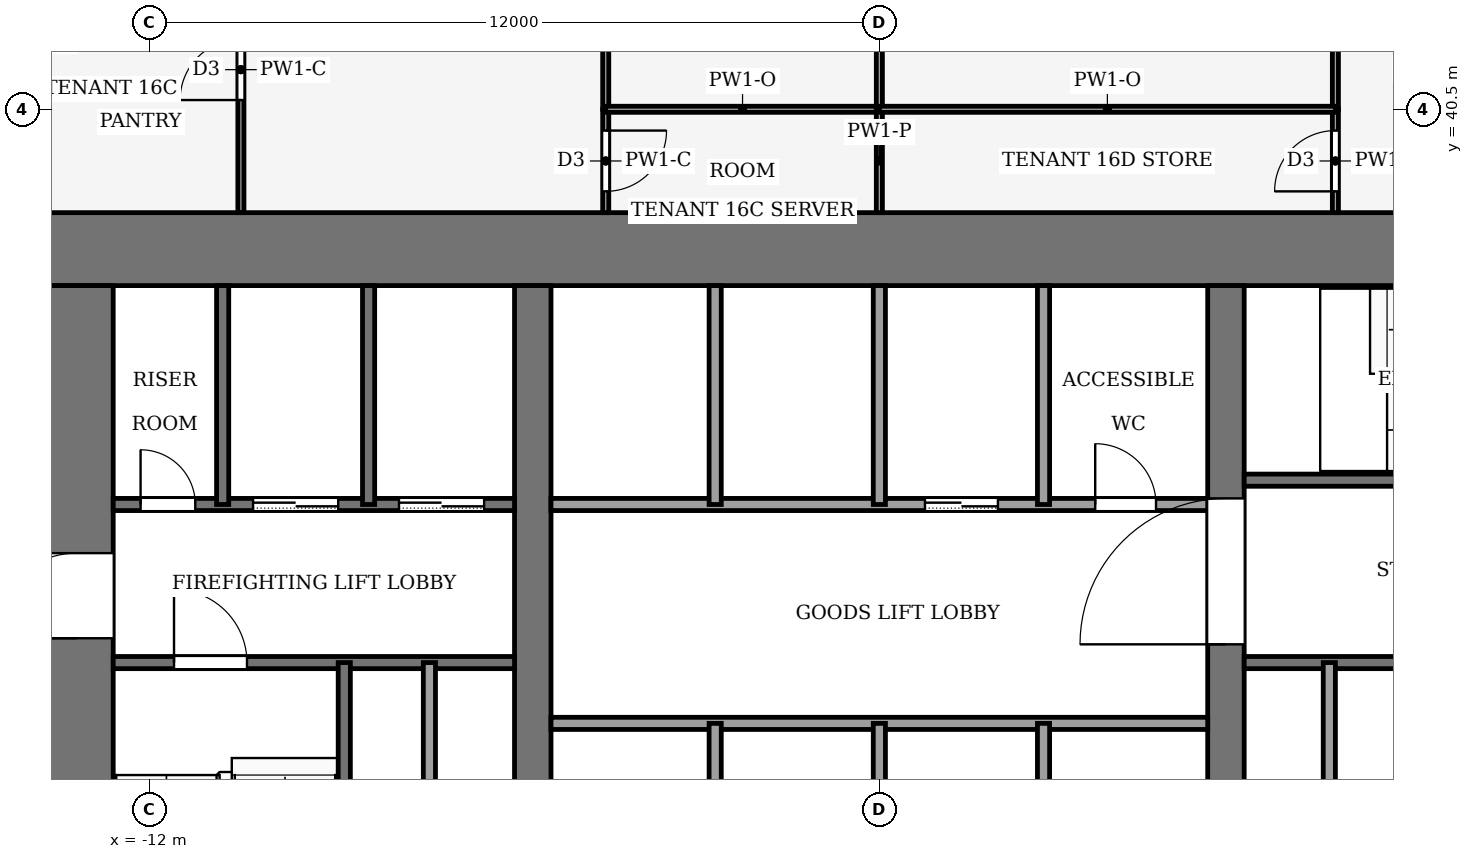
"""IFC4 building model, lengths in metres.
Left out: names, types, materials, properties, quantities, classifications, styles, units other than length and angle.
Written with IfcOpenShell. Run it as: python <this file> out.ifc"""

import sys

from ifc_helpers import new_model, si_unit, direction, frame, frame_2d, origin, place, context, subcontext, project, spatial, rectangle, extrude, element, fill, save


model = new_model("IFC4")
c1 = context("Model", 3, precision=1e-05, world=origin(), true_north=direction((0.0, 1.0)))
c2 = subcontext(c1, "Body", "Model", "MODEL_VIEW")
j1 = project(units=[si_unit("LENGTHUNIT", "METRE"), si_unit("PLANEANGLEUNIT", "RADIAN")], contexts=[c1])
p1 = place(None, origin())
s1 = spatial("IfcSite", under=j1, at=p1, CompositionType="ELEMENT")
p2 = place(p1, origin())
s2 = spatial("IfcBuilding", under=s1, at=p2, CompositionType="ELEMENT")
p3 = place(p2, frame((0.0, 0.0, 74.0)))
s3 = spatial("IfcBuildingStorey", under=s2, at=p3, CompositionType="ELEMENT", Elevation=74.0)
p4 = place(p3, frame((-13.8, 38.2, -0.13), z_axis=(0.0, 0.0, 1.0), x_axis=(1.0, 0.0, 0.0)))
e1 = element("IfcWall", 1, at=p4, inside=s3, PredefinedType="SHEAR", context=c2, shape_type="SweptSolid", body=[
    extrude(rectangle(XDim=27.6, YDim=1.2, at=frame_2d((13.8, 0.0))), origin(), (0.0, 0.0, 1.0), 4.0),
])
p5 = place(p3, frame((-13.2, 18.4, -0.13), z_axis=(0.0, 0.0, 1.0), x_axis=(0.0, 1.0, 0.0)))
e2 = element("IfcWall", 2, at=p5, inside=s3, PredefinedType="SHEAR", context=c2, shape_type="SweptSolid", body=[
    extrude(rectangle(XDim=19.2, YDim=1.2, at=frame_2d((9.6, 0.0))), origin(), (0.0, 0.0, 1.0), 4.0),
])
p6 = place(p5, frame((2.8, 0.0, 0.13)))
e3 = element("IfcOpeningElement", 3, at=p6, cuts=e2, PredefinedType="OPENING", context=c2, shape_type="SweptSolid", body=[
    extrude(rectangle(XDim=2.4, YDim=2.4, at=frame_2d((1.2, 1.2))), frame((0.0, 0.61, 0.0), z_axis=(0.0, -1.0, 0.0), x_axis=(1.0, 0.0, 0.0)), (0.0, 0.0, 1.0), 1.22),
])
p7 = place(p5, frame((13.4, 0.0, 0.13)))
e4 = element("IfcOpeningElement", 4, at=p7, cuts=e2, PredefinedType="OPENING", context=c2, shape_type="SweptSolid", body=[
    extrude(rectangle(XDim=1.4, YDim=2.2, at=frame_2d((0.7, 1.1))), frame((0.0, 0.61, 0.0), z_axis=(0.0, -1.0, 0.0), x_axis=(1.0, 0.0, 0.0)), (0.0, 0.0, 1.0), 1.22),
])
p8 = place(p3, frame((-5.7, 18.4, -0.13), z_axis=(0.0, 0.0, 1.0), x_axis=(0.0, 1.0, 0.0)))
e5 = element("IfcWall", 5, at=p8, inside=s3, PredefinedType="SHEAR", context=c2, shape_type="SweptSolid", body=[
    extrude(rectangle(XDim=19.2, YDim=0.6, at=frame_2d((9.6, 0.0))), origin(), (0.0, 0.0, 1.0), 4.0),
])
p9 = place(p8, frame((8.35, 0.0, 0.13)))
e6 = element("IfcOpeningElement", 6, at=p9, cuts=e5, PredefinedType="OPENING", context=c2, shape_type="SweptSolid", body=[
    extrude(rectangle(XDim=0.9, YDim=2.1, at=frame_2d((0.45, 1.05))), frame((0.0, 0.31, 0.0), z_axis=(0.0, -1.0, 0.0), x_axis=(1.0, 0.0, 0.0)), (0.0, 0.0, 1.0), 0.62),
])
p10 = place(p3, frame((5.7, 18.4, -0.13), z_axis=(0.0, 0.0, 1.0), x_axis=(0.0, 1.0, 0.0)))
e7 = element("IfcWall", 7, at=p10, inside=s3, PredefinedType="SHEAR", context=c2, shape_type="SweptSolid", body=[
    extrude(rectangle(XDim=19.2, YDim=0.6, at=frame_2d((9.6, 0.0))), origin(), (0.0, 0.0, 1.0), 4.0),
])
p11 = place(p10, frame((8.35, 0.0, 0.13)))
e8 = element("IfcOpeningElement", 8, at=p11, cuts=e7, PredefinedType="OPENING", context=c2, shape_type="SweptSolid", body=[
    extrude(rectangle(XDim=0.9, YDim=2.1, at=frame_2d((0.45, 1.05))), frame((0.0, 0.31, 0.0), z_axis=(0.0, -1.0, 0.0), x_axis=(1.0, 0.0, 0.0)), (0.0, 0.0, 1.0), 0.62),
])
p12 = place(p10, frame((13.3, 0.0, 0.13)))
e9 = element("IfcOpeningElement", 9, at=p12, cuts=e7, PredefinedType="OPENING", context=c2, shape_type="SweptSolid", body=[
    extrude(rectangle(XDim=2.4, YDim=2.4, at=frame_2d((1.2, 1.2))), frame((0.0, 0.31, 0.0), z_axis=(0.0, -1.0, 0.0), x_axis=(1.0, 0.0, 0.0)), (0.0, 0.0, 1.0), 0.62),
])
p13 = place(p3, frame((-5.4, 30.4, 0.0), z_axis=(0.0, 0.0, 1.0), x_axis=(1.0, 0.0, 0.0)))
e10 = element("IfcWall", 10, at=p13, inside=s3, PredefinedType="PARTITIONING", context=c2, shape_type="SweptSolid", body=[
    extrude(rectangle(XDim=10.8, YDim=0.2, at=frame_2d((5.4, 0.0))), origin(), (0.0, 0.0, 1.0), 3.87),
])
p14 = place(p3, frame((-12.6, 31.4, 0.0), z_axis=(0.0, 0.0, 1.0), x_axis=(1.0, 0.0, 0.0)))
e11 = element("IfcWall", 11, at=p14, inside=s3, PredefinedType="PARTITIONING", context=c2, shape_type="SweptSolid", body=[
    extrude(rectangle(XDim=6.6, YDim=0.2, at=frame_2d((3.3, 0.0))), origin(), (0.0, 0.0, 1.0), 3.87),
])
p15 = place(p14, frame((1.0, 0.0, 0.0)))
e12 = element("IfcOpeningElement", 12, at=p15, cuts=e11, PredefinedType="OPENING", context=c2, shape_type="SweptSolid", body=[
    extrude(rectangle(XDim=1.2, YDim=2.2, at=frame_2d((0.6, 1.1))), frame((0.0, 0.11, 0.0), z_axis=(0.0, -1.0, 0.0), x_axis=(1.0, 0.0, 0.0)), (0.0, 0.0, 1.0), 0.22),
])
p16 = place(p3, frame((6.0, 31.4, 0.0), z_axis=(0.0, 0.0, 1.0), x_axis=(1.0, 0.0, 0.0)))
e13 = element("IfcWall", 13, at=p16, inside=s3, PredefinedType="PARTITIONING", context=c2, shape_type="SweptSolid", body=[
    extrude(rectangle(XDim=6.6, YDim=0.2, at=frame_2d((3.3, 0.0))), origin(), (0.0, 0.0, 1.0), 3.87),
])
p17 = place(p3, frame((-12.6, 34.0, 0.0), z_axis=(0.0, 0.0, 1.0), x_axis=(1.0, 0.0, 0.0)))
e14 = element("IfcWall", 14, at=p17, inside=s3, PredefinedType="PARTITIONING", context=c2, shape_type="SweptSolid", body=[
    extrude(rectangle(XDim=6.6, YDim=0.2, at=frame_2d((3.3, 0.0))), origin(), (0.0, 0.0, 1.0), 3.87),
])
p18 = place(p17, frame((4.7, 0.0, 0.0)))
e15 = element("IfcOpeningElement", 15, at=p18, cuts=e14, PredefinedType="OPENING", context=c2, shape_type="SweptSolid", body=[
    extrude(rectangle(XDim=1.4, YDim=2.2, at=frame_2d((0.7, 1.1))), frame((0.0, 0.11, 0.0), z_axis=(0.0, -1.0, 0.0), x_axis=(1.0, 0.0, 0.0)), (0.0, 0.0, 1.0), 0.22),
])
p19 = place(p17, frame((2.3, 0.0, 0.0)))
e16 = element("IfcOpeningElement", 16, at=p19, cuts=e14, PredefinedType="OPENING", context=c2, shape_type="SweptSolid", body=[
    extrude(rectangle(XDim=1.4, YDim=2.2, at=frame_2d((0.7, 1.1))), frame((0.0, 0.11, 0.0), z_axis=(0.0, -1.0, 0.0), x_axis=(1.0, 0.0, 0.0)), (0.0, 0.0, 1.0), 0.22),
])
p20 = place(p17, frame((0.45, 0.0, 0.0)))
e17 = element("IfcOpeningElement", 17, at=p20, cuts=e14, PredefinedType="OPENING", context=c2, shape_type="SweptSolid", body=[
    extrude(rectangle(XDim=0.9, YDim=2.1, at=frame_2d((0.45, 1.05))), frame((0.0, 0.11, 0.0), z_axis=(0.0, -1.0, 0.0), x_axis=(1.0, 0.0, 0.0)), (0.0, 0.0, 1.0), 0.22),
])
p21 = place(p3, frame((-5.4, 34.0, 0.0), z_axis=(0.0, 0.0, 1.0), x_axis=(1.0, 0.0, 0.0)))
e18 = element("IfcWall", 18, at=p21, inside=s3, PredefinedType="PARTITIONING", context=c2, shape_type="SweptSolid", body=[
    extrude(rectangle(XDim=10.8, YDim=0.2, at=frame_2d((5.4, 0.0))), origin(), (0.0, 0.0, 1.0), 3.87),
])
p22 = place(p21, frame((6.15, 0.0, 0.0)))
e19 = element("IfcOpeningElement", 19, at=p22, cuts=e18, PredefinedType="OPENING", context=c2, shape_type="SweptSolid", body=[
    extrude(rectangle(XDim=1.2, YDim=2.2, at=frame_2d((0.6, 1.1))), frame((0.0, 0.11, 0.0), z_axis=(0.0, -1.0, 0.0), x_axis=(1.0, 0.0, 0.0)), (0.0, 0.0, 1.0), 0.22),
])
p23 = place(p21, frame((8.95, 0.0, 0.0)))
e20 = element("IfcOpeningElement", 20, at=p23, cuts=e18, PredefinedType="OPENING", context=c2, shape_type="SweptSolid", body=[
    extrude(rectangle(XDim=1.0, YDim=2.1, at=frame_2d((0.5, 1.05))), frame((0.0, 0.11, 0.0), z_axis=(0.0, -1.0, 0.0), x_axis=(1.0, 0.0, 0.0)), (0.0, 0.0, 1.0), 0.22),
])
p24 = place(p3, frame((6.0, 34.4, 0.0), z_axis=(0.0, 0.0, 1.0), x_axis=(1.0, 0.0, 0.0)))
e21 = element("IfcWall", 21, at=p24, inside=s3, PredefinedType="PARTITIONING", context=c2, shape_type="SweptSolid", body=[
    extrude(rectangle(XDim=6.6, YDim=0.2, at=frame_2d((3.3, 0.0))), origin(), (0.0, 0.0, 1.0), 3.87),
])
p25 = place(p24, frame((4.8, 0.0, 0.0)))
e22 = element("IfcOpeningElement", 22, at=p25, cuts=e21, PredefinedType="OPENING", context=c2, shape_type="SweptSolid", body=[
    extrude(rectangle(XDim=1.2, YDim=2.2, at=frame_2d((0.6, 1.1))), frame((0.0, 0.11, 0.0), z_axis=(0.0, -1.0, 0.0), x_axis=(1.0, 0.0, 0.0)), (0.0, 0.0, 1.0), 0.22),
])
p26 = place(p3, frame((-10.8, 34.0, 0.0), z_axis=(0.0, 0.0, 1.0), x_axis=(0.0, 1.0, 0.0)))
e23 = element("IfcWall", 23, at=p26, inside=s3, PredefinedType="PARTITIONING", context=c2, shape_type="SweptSolid", body=[
    extrude(rectangle(XDim=3.6, YDim=0.2, at=frame_2d((1.8, 0.0))), origin(), (0.0, 0.0, 1.0), 3.87),
])
p27 = place(p3, frame((-8.8, 24.0, 0.0), z_axis=(0.0, 0.0, 1.0), x_axis=(0.0, 1.0, 0.0)))
e24 = element("IfcWall", 24, at=p27, inside=s3, PredefinedType="PARTITIONING", context=c2, shape_type="SweptSolid", body=[
    extrude(rectangle(XDim=7.4, YDim=0.2, at=frame_2d((3.7, 0.0))), origin(), (0.0, 0.0, 1.0), 3.87),
])
p28 = place(p3, frame((-8.4, 34.0, 0.0), z_axis=(0.0, 0.0, 1.0), x_axis=(0.0, 1.0, 0.0)))
e25 = element("IfcWall", 25, at=p28, inside=s3, PredefinedType="PARTITIONING", context=c2, shape_type="SweptSolid", body=[
    extrude(rectangle(XDim=3.6, YDim=0.2, at=frame_2d((1.8, 0.0))), origin(), (0.0, 0.0, 1.0), 3.87),
])
p29 = place(p3, frame((-7.4, 24.0, 0.0), z_axis=(0.0, 0.0, 1.0), x_axis=(0.0, 1.0, 0.0)))
e26 = element("IfcWall", 26, at=p29, inside=s3, PredefinedType="PARTITIONING", context=c2, shape_type="SweptSolid", body=[
    extrude(rectangle(XDim=7.4, YDim=0.2, at=frame_2d((3.7, 0.0))), origin(), (0.0, 0.0, 1.0), 3.87),
])
p30 = place(p3, frame((-2.7, 28.0, 0.0), z_axis=(0.0, 0.0, 1.0), x_axis=(0.0, 1.0, 0.0)))
e27 = element("IfcWall", 27, at=p30, inside=s3, PredefinedType="PARTITIONING", context=c2, shape_type="SweptSolid", body=[
    extrude(rectangle(XDim=2.4, YDim=0.2, at=frame_2d((1.2, 0.0))), origin(), (0.0, 0.0, 1.0), 3.87),
])
p31 = place(p3, frame((-2.7, 34.0, 0.0), z_axis=(0.0, 0.0, 1.0), x_axis=(0.0, 1.0, 0.0)))
e28 = element("IfcWall", 28, at=p31, inside=s3, PredefinedType="PARTITIONING", context=c2, shape_type="SweptSolid", body=[
    extrude(rectangle(XDim=3.6, YDim=0.2, at=frame_2d((1.8, 0.0))), origin(), (0.0, 0.0, 1.0), 3.87),
])
p32 = place(p3, frame((0.0, 24.0, 0.0), z_axis=(0.0, 0.0, 1.0), x_axis=(0.0, 1.0, 0.0)))
e29 = element("IfcWall", 29, at=p32, inside=s3, PredefinedType="PARTITIONING", context=c2, shape_type="SweptSolid", body=[
    extrude(rectangle(XDim=6.4, YDim=0.2, at=frame_2d((3.2, 0.0))), origin(), (0.0, 0.0, 1.0), 3.87),
])
p33 = place(p3, frame((0.0, 34.0, 0.0), z_axis=(0.0, 0.0, 1.0), x_axis=(0.0, 1.0, 0.0)))
e30 = element("IfcWall", 30, at=p33, inside=s3, PredefinedType="PARTITIONING", context=c2, shape_type="SweptSolid", body=[
    extrude(rectangle(XDim=3.6, YDim=0.2, at=frame_2d((1.8, 0.0))), origin(), (0.0, 0.0, 1.0), 3.87),
])
p34 = place(p3, frame((2.7, 28.0, 0.0), z_axis=(0.0, 0.0, 1.0), x_axis=(0.0, 1.0, 0.0)))
e31 = element("IfcWall", 31, at=p34, inside=s3, PredefinedType="PARTITIONING", context=c2, shape_type="SweptSolid", body=[
    extrude(rectangle(XDim=2.4, YDim=0.2, at=frame_2d((1.2, 0.0))), origin(), (0.0, 0.0, 1.0), 3.87),
])
p35 = place(p3, frame((2.7, 34.0, 0.0), z_axis=(0.0, 0.0, 1.0), x_axis=(0.0, 1.0, 0.0)))
e32 = element("IfcWall", 32, at=p35, inside=s3, PredefinedType="PARTITIONING", context=c2, shape_type="SweptSolid", body=[
    extrude(rectangle(XDim=3.6, YDim=0.2, at=frame_2d((1.8, 0.0))), origin(), (0.0, 0.0, 1.0), 3.87),
])
p36 = place(p3, frame((7.4, 24.0, 0.0), z_axis=(0.0, 0.0, 1.0), x_axis=(0.0, 1.0, 0.0)))
e33 = element("IfcWall", 33, at=p36, inside=s3, PredefinedType="PARTITIONING", context=c2, shape_type="SweptSolid", body=[
    extrude(rectangle(XDim=7.4, YDim=0.2, at=frame_2d((3.7, 0.0))), origin(), (0.0, 0.0, 1.0), 3.87),
])
p37 = place(p3, frame((-10.5, 38.8, 0.0), z_axis=(0.0, 0.0, 1.0), x_axis=(0.0, 1.0, 0.0)))
e34 = element("IfcWall", 34, at=p37, inside=s3, PredefinedType="PARTITIONING", context=c2, shape_type="SweptSolid", body=[
    extrude(rectangle(XDim=4.704, YDim=0.1, at=frame_2d((2.352, 0.0))), origin(), (0.0, 0.0, 1.0), 3.87),
])
p38 = place(p37, frame((1.852, 0.0, 0.0)))
e35 = element("IfcOpeningElement", 35, at=p38, cuts=e34, PredefinedType="OPENING", context=c2, shape_type="SweptSolid", body=[
    extrude(rectangle(XDim=1.0, YDim=2.1, at=frame_2d((0.5, 1.05))), frame((0.0, 0.06, 0.0), z_axis=(0.0, -1.0, 0.0), x_axis=(1.0, 0.0, 0.0)), (0.0, 0.0, 1.0), 0.12),
])
p39 = place(p3, frame((-4.5, 40.5, 0.0), z_axis=(0.0, 0.0, 1.0), x_axis=(0.0, -1.0, 0.0)))
e36 = element("IfcWall", 36, at=p39, inside=s3, PredefinedType="PARTITIONING", context=c2, shape_type="SweptSolid", body=[
    extrude(rectangle(XDim=1.7, YDim=0.1, at=frame_2d((0.85, 0.0))), origin(), (0.0, 0.0, 1.0), 3.87),
])
p40 = place(p39, frame((0.35, 0.0, 0.0)))
e37 = element("IfcOpeningElement", 37, at=p40, cuts=e36, PredefinedType="OPENING", context=c2, shape_type="SweptSolid", body=[
    extrude(rectangle(XDim=1.0, YDim=2.1, at=frame_2d((0.5, 1.05))), frame((0.0, 0.06, 0.0), z_axis=(0.0, -1.0, 0.0), x_axis=(1.0, 0.0, 0.0)), (0.0, 0.0, 1.0), 0.12),
])
p41 = place(p3, frame((-4.5, 46.5, 0.0), z_axis=(0.0, 0.0, 1.0), x_axis=(0.0, -1.0, 0.0)))
e38 = element("IfcWall", 38, at=p41, inside=s3, PredefinedType="PARTITIONING", context=c2, shape_type="SweptSolid", body=[
    extrude(rectangle(XDim=6.0, YDim=0.1, at=frame_2d((3.0, 0.0))), origin(), (0.0, 0.0, 1.0), 3.87),
])
p42 = place(p41, frame((2.5, 0.0, 0.0)))
e39 = element("IfcOpeningElement", 39, at=p42, cuts=e38, PredefinedType="OPENING", context=c2, shape_type="SweptSolid", body=[
    extrude(rectangle(XDim=1.0, YDim=2.1, at=frame_2d((0.5, 1.05))), frame((0.0, 0.06, 0.0), z_axis=(0.0, -1.0, 0.0), x_axis=(1.0, 0.0, 0.0)), (0.0, 0.0, 1.0), 0.12),
])
p43 = place(p3, frame((0.0, 40.5, 0.0), z_axis=(0.0, 0.0, 1.0), x_axis=(-1.0, 0.0, 0.0)))
e40 = element("IfcWall", 40, at=p43, inside=s3, PredefinedType="PARTITIONING", context=c2, shape_type="SweptSolid", body=[
    extrude(rectangle(XDim=4.5, YDim=0.1, at=frame_2d((2.25, 0.0))), origin(), (0.0, 0.0, 1.0), 3.39),
])
p44 = place(p3, frame((0.0, 38.8, 0.0), z_axis=(0.0, 0.0, 1.0), x_axis=(0.0, 1.0, 0.0)))
e41 = element("IfcWall", 41, at=p44, inside=s3, PredefinedType="PARTITIONING", context=c2, shape_type="SweptSolid", body=[
    extrude(rectangle(XDim=1.7, YDim=0.1, at=frame_2d((0.85, 0.0))), origin(), (0.0, 0.0, 1.0), 3.44),
])
p45 = place(p3, frame((0.0, 40.5, 0.0), z_axis=(0.0, 0.0, 1.0), x_axis=(0.0, 1.0, 0.0)))
e42 = element("IfcWall", 42, at=p45, inside=s3, PredefinedType="PARTITIONING", context=c2, shape_type="SweptSolid", body=[
    extrude(rectangle(XDim=3.0, YDim=0.1, at=frame_2d((1.5, 0.0))), origin(), (0.0, 0.0, 1.0), 3.44),
])
p46 = place(p3, frame((7.5, 38.8, 0.0), z_axis=(0.0, 0.0, 1.0), x_axis=(0.0, 1.0, 0.0)))
e43 = element("IfcWall", 43, at=p46, inside=s3, PredefinedType="PARTITIONING", context=c2, shape_type="SweptSolid", body=[
    extrude(rectangle(XDim=1.7, YDim=0.1, at=frame_2d((0.85, 0.0))), origin(), (0.0, 0.0, 1.0), 3.87),
])
p47 = place(p46, frame((0.35, 0.0, 0.0)))
e44 = element("IfcOpeningElement", 44, at=p47, cuts=e43, PredefinedType="OPENING", context=c2, shape_type="SweptSolid", body=[
    extrude(rectangle(XDim=1.0, YDim=2.1, at=frame_2d((0.5, 1.05))), frame((0.0, 0.06, 0.0), z_axis=(0.0, -1.0, 0.0), x_axis=(1.0, 0.0, 0.0)), (0.0, 0.0, 1.0), 0.12),
])
p48 = place(p3, frame((7.5, 40.5, 0.0), z_axis=(0.0, 0.0, 1.0), x_axis=(0.0, 1.0, 0.0)))
e45 = element("IfcWall", 45, at=p48, inside=s3, PredefinedType="PARTITIONING", context=c2, shape_type="SweptSolid", body=[
    extrude(rectangle(XDim=3.0, YDim=0.1, at=frame_2d((1.5, 0.0))), origin(), (0.0, 0.0, 1.0), 3.87),
])
p49 = place(p48, frame((1.4, 0.0, 0.0)))
e46 = element("IfcOpeningElement", 46, at=p49, cuts=e45, PredefinedType="OPENING", context=c2, shape_type="SweptSolid", body=[
    extrude(rectangle(XDim=1.0, YDim=2.1, at=frame_2d((0.5, 1.05))), frame((0.0, 0.06, 0.0), z_axis=(0.0, -1.0, 0.0), x_axis=(1.0, 0.0, 0.0)), (0.0, 0.0, 1.0), 0.12),
])
p50 = place(p3, frame((7.5, 40.5, 0.0), z_axis=(0.0, 0.0, 1.0), x_axis=(-1.0, 0.0, 0.0)))
e47 = element("IfcWall", 47, at=p50, inside=s3, PredefinedType="PARTITIONING", context=c2, shape_type="SweptSolid", body=[
    extrude(rectangle(XDim=7.5, YDim=0.1, at=frame_2d((3.75, 0.0))), origin(), (0.0, 0.0, 1.0), 3.39),
])
p51 = place(p22, origin())
e48 = element("IfcDoor", 48, at=p51, inside=s3, OperationType="SLIDING_TO_LEFT", PredefinedType="DOOR", context=c2, shape_type="SweptSolid", body=[
    extrude(rectangle(XDim=1.2, YDim=2.2, at=frame_2d((0.6, 1.1))), frame((0.0, 0.025, 0.0), z_axis=(0.0, -1.0, 0.0), x_axis=(1.0, 0.0, 0.0)), (0.0, 0.0, 1.0), 0.05),
])
fill(e19, e48)
p52 = place(p18, origin())
e49 = element("IfcDoor", 49, at=p52, inside=s3, OperationType="SLIDING_TO_LEFT", PredefinedType="DOOR", context=c2, shape_type="SweptSolid", body=[
    extrude(rectangle(XDim=1.4, YDim=2.2, at=frame_2d((0.7, 1.1))), frame((0.0, 0.025, 0.0), z_axis=(0.0, -1.0, 0.0), x_axis=(1.0, 0.0, 0.0)), (0.0, 0.0, 1.0), 0.05),
])
fill(e15, e49)
p53 = place(p19, origin())
e50 = element("IfcDoor", 50, at=p53, inside=s3, OperationType="SLIDING_TO_LEFT", PredefinedType="DOOR", context=c2, shape_type="SweptSolid", body=[
    extrude(rectangle(XDim=1.4, YDim=2.2, at=frame_2d((0.7, 1.1))), frame((0.0, 0.025, 0.0), z_axis=(0.0, -1.0, 0.0), x_axis=(1.0, 0.0, 0.0)), (0.0, 0.0, 1.0), 0.05),
])
fill(e16, e50)
p54 = place(p20, origin())
e51 = element("IfcDoor", 51, at=p54, inside=s3, OperationType="SINGLE_SWING_RIGHT", PredefinedType="DOOR", context=c2, shape_type="SweptSolid", body=[
    extrude(rectangle(XDim=0.9, YDim=2.1, at=frame_2d((0.45, 1.05))), frame((0.0, 0.025, 0.0), z_axis=(0.0, -1.0, 0.0), x_axis=(1.0, 0.0, 0.0)), (0.0, 0.0, 1.0), 0.05),
])
fill(e17, e51)
p55 = place(p23, origin())
e52 = element("IfcDoor", 52, at=p55, inside=s3, OperationType="SINGLE_SWING_LEFT", PredefinedType="DOOR", context=c2, shape_type="SweptSolid", body=[
    extrude(rectangle(XDim=1.0, YDim=2.1, at=frame_2d((0.5, 1.05))), frame((0.0, 0.025, 0.0), z_axis=(0.0, -1.0, 0.0), x_axis=(1.0, 0.0, 0.0)), (0.0, 0.0, 1.0), 0.05),
])
fill(e20, e52)
p56 = place(p15, origin())
e53 = element("IfcDoor", 53, at=p56, inside=s3, OperationType="SINGLE_SWING_RIGHT", PredefinedType="DOOR", context=c2, shape_type="SweptSolid", body=[
    extrude(rectangle(XDim=1.2, YDim=2.2, at=frame_2d((0.6, 1.1))), frame((0.0, 0.025, 0.0), z_axis=(0.0, -1.0, 0.0), x_axis=(1.0, 0.0, 0.0)), (0.0, 0.0, 1.0), 0.05),
])
fill(e12, e53)
p57 = place(p12, origin())
e54 = element("IfcDoor", 54, at=p57, inside=s3, OperationType="DOUBLE_DOOR_SINGLE_SWING", PredefinedType="DOOR", context=c2, shape_type="SweptSolid", body=[
    extrude(rectangle(XDim=2.4, YDim=2.4, at=frame_2d((1.2, 1.2))), frame((0.0, 0.025, 0.0), z_axis=(0.0, -1.0, 0.0), x_axis=(1.0, 0.0, 0.0)), (0.0, 0.0, 1.0), 0.05),
])
fill(e9, e54)
p58 = place(p7, origin())
e55 = element("IfcDoor", 55, at=p58, inside=s3, OperationType="SINGLE_SWING_RIGHT", PredefinedType="DOOR", context=c2, shape_type="SweptSolid", body=[
    extrude(rectangle(XDim=1.4, YDim=2.2, at=frame_2d((0.7, 1.1))), frame((0.0, 0.025, 0.0), z_axis=(0.0, -1.0, 0.0), x_axis=(1.0, 0.0, 0.0)), (0.0, 0.0, 1.0), 0.05),
])
fill(e4, e55)
p59 = place(p38, origin())
e56 = element("IfcDoor", 56, at=p59, inside=s3, OperationType="SINGLE_SWING_RIGHT", PredefinedType="DOOR", context=c2, shape_type="SweptSolid", body=[
    extrude(rectangle(XDim=1.0, YDim=2.1, at=frame_2d((0.5, 1.05))), frame((0.0, 0.025, 0.0), z_axis=(0.0, -1.0, 0.0), x_axis=(1.0, 0.0, 0.0)), (0.0, 0.0, 1.0), 0.05),
])
fill(e35, e56)
p60 = place(p40, origin())
e57 = element("IfcDoor", 57, at=p60, inside=s3, OperationType="SINGLE_SWING_LEFT", PredefinedType="DOOR", context=c2, shape_type="SweptSolid", body=[
    extrude(rectangle(XDim=1.0, YDim=2.1, at=frame_2d((0.5, 1.05))), frame((0.0, 0.025, 0.0), z_axis=(0.0, -1.0, 0.0), x_axis=(1.0, 0.0, 0.0)), (0.0, 0.0, 1.0), 0.05),
])
fill(e37, e57)
p61 = place(p47, origin())
e58 = element("IfcDoor", 58, at=p61, inside=s3, OperationType="SINGLE_SWING_LEFT", PredefinedType="DOOR", context=c2, shape_type="SweptSolid", body=[
    extrude(rectangle(XDim=1.0, YDim=2.1, at=frame_2d((0.5, 1.05))), frame((0.0, 0.025, 0.0), z_axis=(0.0, -1.0, 0.0), x_axis=(1.0, 0.0, 0.0)), (0.0, 0.0, 1.0), 0.05),
])
fill(e44, e58)
save(model, sys.argv[1])
